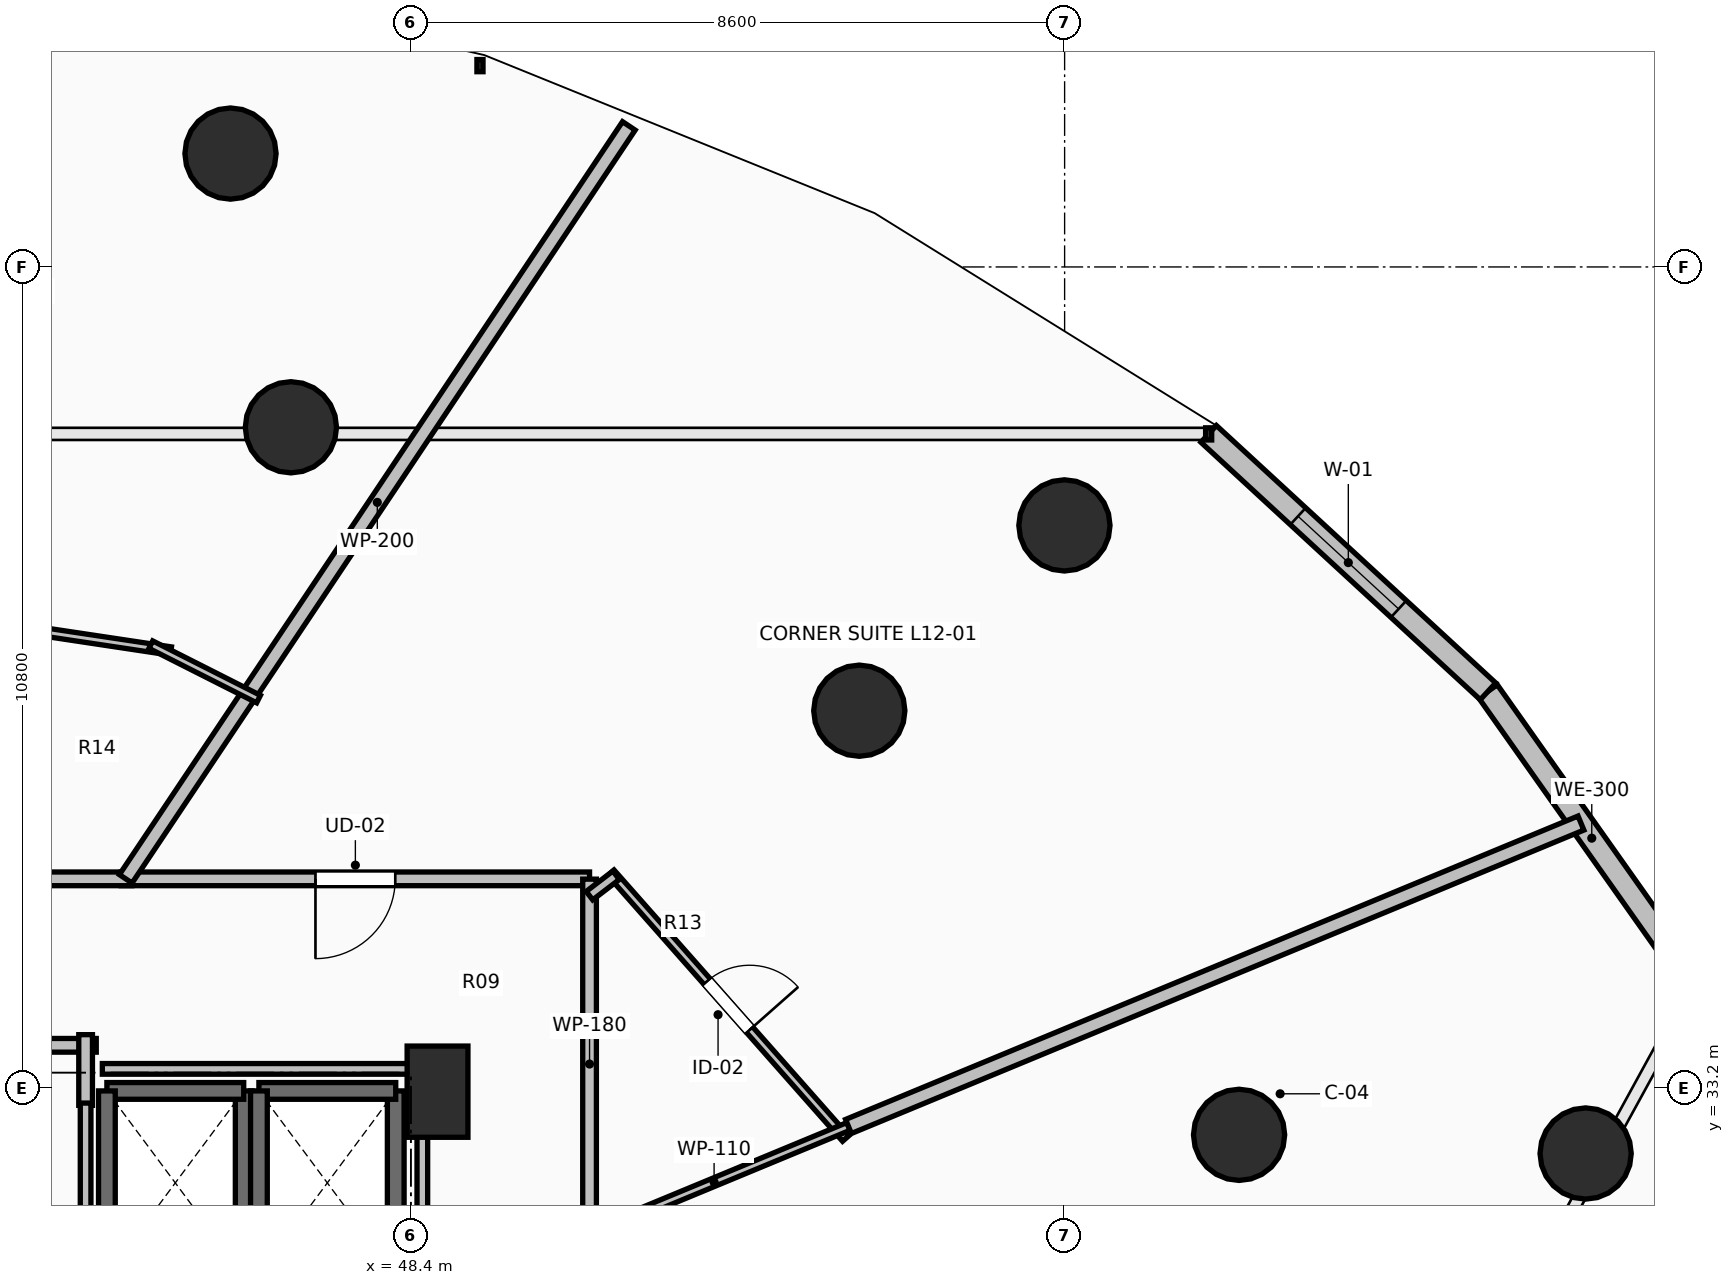
"""IFC4 building model, lengths in metres.
Left out: names, types, materials, properties, quantities, classifications, styles, units other than length and angle.
Written with IfcOpenShell. Run it as: python <this file> out.ifc"""

import sys

from ifc_helpers import new_model, si_unit, direction, frame, frame_2d, origin, origin_2d, place, context, subcontext, project, spatial, rectangle, circle, extrude, element, fill, save


model = new_model("IFC4")
c1 = context("Model", 3, precision=1e-05, world=origin(), true_north=direction((0.0, 1.0)))
c2 = subcontext(c1, "Body", "Model", "MODEL_VIEW")
j1 = project(units=[si_unit("LENGTHUNIT", "METRE"), si_unit("PLANEANGLEUNIT", "RADIAN")], contexts=[c1])
p1 = place(None, origin())
s1 = spatial("IfcSite", under=j1, at=p1, CompositionType="ELEMENT")
p2 = place(p1, origin())
s2 = spatial("IfcBuilding", under=s1, at=p2, CompositionType="ELEMENT")
p3 = place(p2, frame((0.0, 0.0, 48.5)))
s3 = spatial("IfcBuildingStorey", under=s2, at=p3, CompositionType="ELEMENT", Elevation=48.5)
for number, where, z_axis, x_axis in (
    (1, (59.295, 32.582, 0.0), (0.0, 0.0, 1.0), (0.924, 0.383, 0.0)),
    (2, (54.299, 38.162, 0.0), (0.0, 0.0, 1.0), (0.707, 0.707, 0.0)),
    (3, (46.821, 41.891, 0.0), (0.0, 0.0, 1.0), (0.383, 0.924, 0.0)),
    (4, (63.854, 32.337, 0.0), (0.0, 0.0, 1.0), (0.924, 0.383, 0.0)),
    (5, (56.997, 40.6, 0.0), (0.0, 0.0, 1.0), (0.707, 0.707, 0.0)),
    (6, (46.026, 45.492, 0.0), (0.0, 0.0, 1.0), (0.383, 0.924, 0.0)),
):
    element("IfcColumn", number, at=place(p3, frame(where, z_axis=z_axis, x_axis=x_axis)), inside=s3, PredefinedType="COLUMN", context=c2, shape_type="SweptSolid", body=[
        extrude(circle(Radius=0.6, at=origin_2d()), origin(), (0.0, 0.0, 1.0), 3.5),
    ])
p4 = place(p3, frame((48.75, 33.15, 0.0), z_axis=(0.0, 0.0, 1.0), x_axis=(1.0, 0.0, 0.0)))
e7 = element("IfcColumn", 7, at=p4, inside=s3, PredefinedType="PILASTER", context=c2, shape_type="SweptSolid", body=[
    extrude(rectangle(XDim=0.8, YDim=1.2, at=origin_2d()), origin(), (0.0, 0.0, 1.0), 3.5),
])
p5 = place(p3, frame((65.301, 34.553, 0.0), z_axis=(0.0, 0.0, 1.0), x_axis=(-0.577130815624, 0.816651713803, 0.0)))
e8 = element("IfcWall", 8, at=p5, inside=s3, PredefinedType="STANDARD", context=c2, shape_type="SweptSolid", body=[
    extrude(rectangle(XDim=4.731, YDim=0.3, at=frame_2d((2.366, 0.0))), origin(), (0.0, 0.0, 1.0), 3.24),
])
p6 = place(p3, frame((62.57, 38.417, 0.0), z_axis=(0.0, 0.0, 1.0), x_axis=(-0.735342629635, 0.677695519419, 0.0)))
e9 = element("IfcWall", 9, at=p6, inside=s3, PredefinedType="STANDARD", context=c2, shape_type="SweptSolid", body=[
    extrude(rectangle(XDim=4.997, YDim=0.3, at=frame_2d((2.499, 0.0))), origin(), (0.0, 0.0, 1.0), 3.24),
])
p7 = place(p6, frame((1.599, 0.0, 0.85)))
e10 = element("IfcOpeningElement", 10, at=p7, cuts=e9, PredefinedType="OPENING", context=c2, shape_type="SweptSolid", body=[
    extrude(rectangle(XDim=1.8, YDim=2.19, at=frame_2d((0.9, 1.095))), frame((0.0, 0.165, 0.0), z_axis=(0.0, -1.0, 0.0), x_axis=(1.0, 0.0, 0.0)), (0.0, 0.0, 1.0), 0.33),
])
p8 = place(p3, frame((46.2, 30.74, 0.0), z_axis=(0.0, 0.0, 1.0), x_axis=(0.0, 1.0, 0.0)))
e11 = element("IfcWall", 11, at=p8, inside=s3, PredefinedType="SOLIDWALL", context=c2, shape_type="SweptSolid", body=[
    extrude(rectangle(XDim=2.42, YDim=0.22, at=frame_2d((1.21, 0.0))), origin(), (0.0, 0.0, 1.0), 3.24),
])
p9 = place(p3, frame((46.2, 33.16, 0.0), z_axis=(0.0, 0.0, 1.0), x_axis=(-1.0, 0.0, 0.0)))
e12 = element("IfcWall", 12, at=p9, inside=s3, PredefinedType="SOLIDWALL", context=c2, shape_type="SweptSolid", body=[
    extrude(rectangle(XDim=1.8, YDim=0.22, at=frame_2d((0.9, 0.0))), origin(), (0.0, 0.0, 1.0), 3.24),
])
for number, where, z_axis, x_axis in (
    (13, (44.4, 33.16, 0.0), (0.0, 0.0, 1.0), (0.0, -1.0, 0.0)),
    (14, (48.2, 30.74, 0.0), (0.0, 0.0, 1.0), (0.0, 1.0, 0.0)),
):
    element("IfcWall", number, at=place(p3, frame(where, z_axis=z_axis, x_axis=x_axis)), inside=s3, PredefinedType="SOLIDWALL", context=c2, shape_type="SweptSolid", body=[
        extrude(rectangle(XDim=2.42, YDim=0.22, at=frame_2d((1.21, 0.0))), origin(), (0.0, 0.0, 1.0), 3.24),
    ])
p10 = place(p3, frame((48.2, 33.16, 0.0), z_axis=(0.0, 0.0, 1.0), x_axis=(-1.0, 0.0, 0.0)))
e15 = element("IfcWall", 15, at=p10, inside=s3, PredefinedType="SOLIDWALL", context=c2, shape_type="SweptSolid", body=[
    extrude(rectangle(XDim=1.8, YDim=0.22, at=frame_2d((0.9, 0.0))), origin(), (0.0, 0.0, 1.0), 3.24),
])
p11 = place(p3, frame((46.4, 33.16, 0.0), z_axis=(0.0, 0.0, 1.0), x_axis=(0.0, -1.0, 0.0)))
e16 = element("IfcWall", 16, at=p11, inside=s3, PredefinedType="SOLIDWALL", context=c2, shape_type="SweptSolid", body=[
    extrude(rectangle(XDim=2.42, YDim=0.22, at=frame_2d((1.21, 0.0))), origin(), (0.0, 0.0, 1.0), 3.24),
])
p12 = place(p3, frame((44.26, 33.76, 0.0), z_axis=(0.0, 0.0, 1.0), x_axis=(-1.0, 0.0, 0.0)))
e17 = element("IfcWall", 17, at=p12, inside=s3, PredefinedType="PARTITIONING", context=c2, shape_type="SweptSolid", body=[
    extrude(rectangle(XDim=4.61, YDim=0.18, at=frame_2d((2.305, 0.0))), origin(), (0.0, 0.0, 1.0), 3.24),
])
p13 = place(p12, frame((1.88, 0.0, 0.0)))
e18 = element("IfcOpeningElement", 18, at=p13, cuts=e17, PredefinedType="OPENING", context=c2, shape_type="SweptSolid", body=[
    extrude(rectangle(XDim=0.85, YDim=2.1, at=frame_2d((0.425, 1.05))), frame((0.0, 0.105, 0.0), z_axis=(0.0, -1.0, 0.0), x_axis=(1.0, 0.0, 0.0)), (0.0, 0.0, 1.0), 0.21),
])
p14 = place(p3, frame((44.12, 32.97, 0.0), z_axis=(0.0, 0.0, 1.0), x_axis=(0.0, 1.0, 0.0)))
e19 = element("IfcWall", 19, at=p14, inside=s3, PredefinedType="PARTITIONING", context=c2, shape_type="SweptSolid", body=[
    extrude(rectangle(XDim=0.93, YDim=0.18, at=frame_2d((0.465, 0.0))), origin(), (0.0, 0.0, 1.0), 3.24),
])
p15 = place(p3, frame((50.75, 35.95, 0.0), z_axis=(0.0, 0.0, 1.0), x_axis=(-1.0, 0.0, 0.0)))
e20 = element("IfcWall", 20, at=p15, inside=s3, PredefinedType="PARTITIONING", context=c2, shape_type="SweptSolid", body=[
    extrude(rectangle(XDim=6.162, YDim=0.18, at=frame_2d((3.081, 0.0))), origin(), (0.0, 0.0, 1.0), 2.432),
])
p16 = place(p15, frame((2.556, 0.0, 0.0)))
e21 = element("IfcOpeningElement", 21, at=p16, cuts=e20, PredefinedType="OPENING", context=c2, shape_type="SweptSolid", body=[
    extrude(rectangle(XDim=1.05, YDim=2.2, at=frame_2d((0.525, 1.1))), frame((0.0, 0.105, 0.0), z_axis=(0.0, -1.0, 0.0), x_axis=(1.0, 0.0, 0.0)), (0.0, 0.0, 1.0), 0.21),
])
p17 = place(p3, frame((50.75, 31.081, 0.0), z_axis=(0.0, 0.0, 1.0), x_axis=(0.0, 1.0, 0.0)))
e22 = element("IfcWall", 22, at=p17, inside=s3, PredefinedType="PARTITIONING", context=c2, shape_type="SweptSolid", body=[
    extrude(rectangle(XDim=4.865, YDim=0.18, at=frame_2d((2.433, 0.0))), origin(), (0.0, 0.0, 1.0), 2.432),
])
p18 = place(p3, frame((44.728, 35.95, 0.0), z_axis=(0.0, 0.0, 1.0), x_axis=(-1.0, 0.0, 0.0)))
e23 = element("IfcWall", 23, at=p18, inside=s3, PredefinedType="PARTITIONING", context=c2, shape_type="SweptSolid", body=[
    extrude(rectangle(XDim=3.398, YDim=0.18, at=frame_2d((1.699, 0.0))), origin(), (0.0, 0.0, 1.0), 3.24),
])
p19 = place(p3, frame((51.031, 36.03, 0.0), z_axis=(0.0, 0.0, 1.0), x_axis=(0.662106207726, -0.749410014405, 0.0)))
e24 = element("IfcWall", 24, at=p19, inside=s3, PredefinedType="PARTITIONING", context=c2, shape_type="SweptSolid", body=[
    extrude(rectangle(XDim=4.665, YDim=0.11, at=frame_2d((2.332, 0.0))), origin(), (0.0, 0.0, 1.0), 2.432),
])
p20 = place(p19, frame((1.907, 0.0, 0.0)))
e25 = element("IfcOpeningElement", 25, at=p20, cuts=e24, PredefinedType="OPENING", context=c2, shape_type="SweptSolid", body=[
    extrude(rectangle(XDim=0.85, YDim=2.1, at=frame_2d((0.425, 1.05))), frame((0.0, 0.07, 0.0), z_axis=(0.0, -1.0, 0.0), x_axis=(1.0, 0.0, 0.0)), (0.0, 0.0, 1.0), 0.14),
])
p21 = place(p3, frame((54.156, 32.693, 0.0), z_axis=(0.0, 0.0, 1.0), x_axis=(-0.923803754276, -0.382866326002, 0.0)))
e26 = element("IfcWall", 26, at=p21, inside=s3, PredefinedType="PARTITIONING", context=c2, shape_type="SweptSolid", body=[
    extrude(rectangle(XDim=3.827, YDim=0.11, at=frame_2d((1.914, 0.0))), origin(), (0.0, 0.0, 1.0), 2.432),
])
p22 = place(p3, frame((51.267, 45.856, 0.0), z_axis=(0.0, 0.0, 1.0), x_axis=(-0.55557946655, -0.831463442581, 0.0)))
e27 = element("IfcWall", 27, at=p22, inside=s3, PredefinedType="PARTITIONING", context=c2, shape_type="SweptSolid", body=[
    extrude(rectangle(XDim=11.914, YDim=0.2, at=frame_2d((5.957, 0.0))), origin(), (0.0, 0.0, 1.0), 2.432),
])
p23 = place(p3, frame((54.156, 32.692, 0.0), z_axis=(0.0, 0.0, 1.0), x_axis=(0.923866486063, 0.38271492776, 0.0)))
e28 = element("IfcWall", 28, at=p23, inside=s3, PredefinedType="PARTITIONING", context=c2, shape_type="SweptSolid", body=[
    extrude(rectangle(XDim=10.431, YDim=0.2, at=frame_2d((5.215, 0.0))), origin(), (0.0, 0.0, 1.0), 2.432),
])
p24 = place(p3, frame((42.432, 39.37, 0.0), z_axis=(0.0, 0.0, 1.0), x_axis=(0.988877663763, -0.148731187416, 0.0)))
e29 = element("IfcWall", 29, at=p24, inside=s3, PredefinedType="PARTITIONING", context=c2, shape_type="SweptSolid", body=[
    extrude(rectangle(XDim=2.841, YDim=0.11, at=frame_2d((1.421, 0.0))), origin(), (0.0, 0.0, 1.0), 3.24),
])
p25 = place(p3, frame((44.978, 39.031, 0.0), z_axis=(0.0, 0.0, 1.0), x_axis=(0.892388427115, -0.451268096758, 0.0)))
e30 = element("IfcWall", 30, at=p25, inside=s3, PredefinedType="PARTITIONING", context=c2, shape_type="SweptSolid", body=[
    extrude(rectangle(XDim=1.588, YDim=0.11, at=frame_2d((0.794, 0.0))), origin(), (0.0, 0.0, 1.0), 3.24),
])
p26 = place(p3, frame((44.12, 30.34, 0.0), z_axis=(0.0, 0.0, 1.0), x_axis=(0.0, 1.0, 0.0)))
e31 = element("IfcWall", 31, at=p26, inside=s3, PredefinedType="PARTITIONING", context=c2, shape_type="SweptSolid", body=[
    extrude(rectangle(XDim=2.66, YDim=0.14, at=frame_2d((1.33, 0.0))), origin(), (0.0, 0.0, 1.0), 3.24),
])
p27 = place(p3, frame((44.34, 33.45, 0.0), z_axis=(0.0, 0.0, 1.0), x_axis=(1.0, 0.0, 0.0)))
e32 = element("IfcWall", 32, at=p27, inside=s3, PredefinedType="PARTITIONING", context=c2, shape_type="SweptSolid", body=[
    extrude(rectangle(XDim=4.21, YDim=0.14, at=frame_2d((2.105, 0.0))), origin(), (0.0, 0.0, 1.0), 2.432),
])
p28 = place(p3, frame((48.55, 33.45, 0.0), z_axis=(0.0, 0.0, 1.0), x_axis=(0.0, -1.0, 0.0)))
e33 = element("IfcWall", 33, at=p28, inside=s3, PredefinedType="PARTITIONING", context=c2, shape_type="SweptSolid", body=[
    extrude(rectangle(XDim=5.254, YDim=0.14, at=frame_2d((2.627, 0.0))), origin(), (0.0, 0.0, 1.0), 2.432),
])
p29 = place(p3, frame((51.099, 35.997, 0.0), z_axis=(0.0, 0.0, 1.0), x_axis=(-0.794185002189, -0.607676050456, 0.0)))
e34 = element("IfcWall", 34, at=p29, inside=s3, PredefinedType="PARTITIONING", context=c2, shape_type="SweptSolid", body=[
    extrude(rectangle(XDim=0.441, YDim=0.14, at=frame_2d((0.221, 0.0))), origin(), (0.0, 0.0, 1.0), 2.886),
])
p30 = place(p7, origin())
e35 = element("IfcWindow", 35, at=p30, inside=s3, PartitioningType="SINGLE_PANEL", PredefinedType="WINDOW", context=c2, shape_type="SweptSolid", body=[
    extrude(rectangle(XDim=1.8, YDim=2.19, at=frame_2d((0.9, 1.095))), frame((0.0, 0.03, 0.0), z_axis=(0.0, -1.0, 0.0), x_axis=(1.0, 0.0, 0.0)), (0.0, 0.0, 1.0), 0.06),
])
fill(e10, e35)
p31 = place(p16, origin())
e36 = element("IfcDoor", 36, at=p31, inside=s3, OperationType="SINGLE_SWING_RIGHT", PredefinedType="DOOR", context=c2, shape_type="SweptSolid", body=[
    extrude(rectangle(XDim=1.05, YDim=2.2, at=frame_2d((0.525, 1.1))), frame((0.0, 0.025, 0.0), z_axis=(0.0, -1.0, 0.0), x_axis=(1.0, 0.0, 0.0)), (0.0, 0.0, 1.0), 0.05),
])
fill(e21, e36)
p32 = place(p20, origin())
e37 = element("IfcDoor", 37, at=p32, inside=s3, OperationType="SINGLE_SWING_RIGHT", PredefinedType="DOOR", context=c2, shape_type="SweptSolid", body=[
    extrude(rectangle(XDim=0.85, YDim=2.1, at=frame_2d((0.425, 1.05))), frame((0.0, 0.025, 0.0), z_axis=(0.0, -1.0, 0.0), x_axis=(1.0, 0.0, 0.0)), (0.0, 0.0, 1.0), 0.05),
])
fill(e25, e37)
save(model, sys.argv[1])
